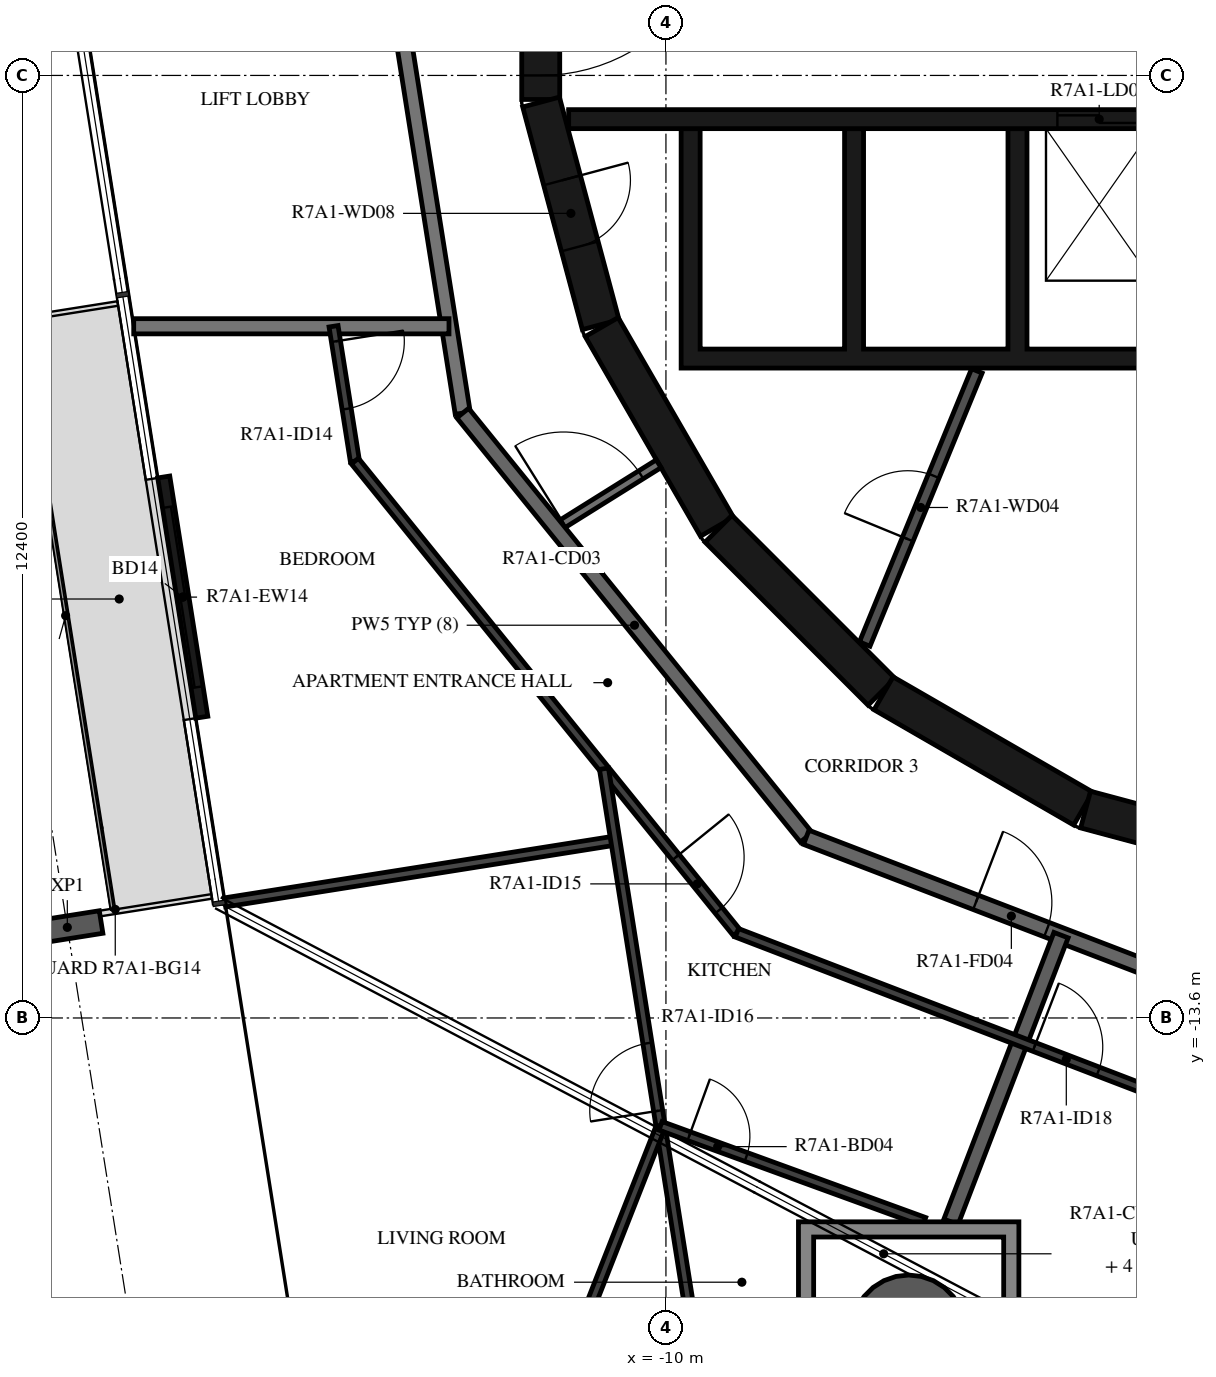
"""IFC4 building model, lengths in metres.
Left out: names, types, materials, properties, quantities, classifications, styles, units other than length and angle.
Written with IfcOpenShell. Run it as: python <this file> out.ifc"""

import sys

from ifc_helpers import new_model, si_unit, direction, frame, frame_2d, origin, origin_2d, place, context, subcontext, project, spatial, polyline, rectangle, hollow_circle, i_section, outline, extrude, element, fill, save


model = new_model("IFC4")
c1 = context("Model", 3, precision=1e-05, world=origin(), true_north=direction((0.0, 1.0)))
c2 = subcontext(c1, "Body", "Model", "MODEL_VIEW")
j1 = project(units=[si_unit("LENGTHUNIT", "METRE"), si_unit("PLANEANGLEUNIT", "RADIAN")], contexts=[c1])
p1 = place(None, origin())
s1 = spatial("IfcSite", under=j1, at=p1, CompositionType="ELEMENT")
p2 = place(p1, origin())
s2 = spatial("IfcBuilding", under=s1, at=p2, CompositionType="ELEMENT")
p3 = place(p2, frame((0.0, 0.0, 266.9)))
s3 = spatial("IfcBuildingStorey", under=s2, at=p3, CompositionType="ELEMENT", Elevation=266.9)
p4 = place(p3, frame((-6.807, -17.732, -0.38), z_axis=(0.0, 0.0, 1.0), x_axis=(1.0, 0.0, 0.0)))
e1 = element("IfcColumn", 1, at=p4, inside=s3, PredefinedType="COLUMN", context=c2, shape_type="SweptSolid", body=[
    extrude(hollow_circle(Radius=0.75, WallThickness=0.035, at=origin_2d()), origin(), (0.0, 0.0, 1.0), 3.5),
])
p5 = place(p3, frame((-17.875, -12.408, -0.38), z_axis=(0.0, 0.0, 1.0), x_axis=(-0.156434064006, 0.987688404113, 0.0)))
e2 = element("IfcColumn", 2, at=p5, inside=s3, PredefinedType="COLUMN", context=c2, shape_type="SweptSolid", body=[
    extrude(i_section(OverallWidth=0.3, OverallDepth=0.9, WebThickness=0.019, FlangeThickness=0.035, FilletRadius=0.03, at=origin_2d()), origin(), (0.0, 0.0, 1.0), 3.5),
])
p6 = place(p3, frame((-16.607, -6.483, 0.0), z_axis=(0.0, 0.0, 1.0), x_axis=(0.156401347891, -0.987693585267, 0.0)))
e3 = element("IfcWall", 3, at=p6, inside=s3, PredefinedType="STANDARD", context=c2, shape_type="SweptSolid", body=[
    extrude(rectangle(XDim=3.2, YDim=0.16, at=frame_2d((1.6, 0.0))), origin(), (0.0, 0.0, 1.0), 3.12),
])
p7 = place(p6, frame((0.4, 0.0, 0.0)))
e4 = element("IfcOpeningElement", 4, at=p7, cuts=e3, PredefinedType="OPENING", context=c2, shape_type="SweptSolid", body=[
    extrude(rectangle(XDim=2.4, YDim=2.4, at=frame_2d((1.2, 1.2))), frame((0.0, 0.09, 0.0), z_axis=(0.0, -1.0, 0.0), x_axis=(1.0, 0.0, 0.0)), (0.0, 0.0, 1.0), 0.18),
])
p8 = place(p3, frame((-11.647, 1.516, 0.0), z_axis=(0.0, 0.0, 1.0), x_axis=(0.0, -1.0, 0.0)))
e5 = element("IfcWall", 5, at=p8, inside=s3, PredefinedType="SHEAR", context=c2, shape_type="SweptSolid", body=[
    extrude(rectangle(XDim=3.033, YDim=0.5, at=frame_2d((1.516, 0.0))), origin(), (0.0, 0.0, 1.0), 3.12),
])
p9 = place(p8, frame((0.316, 0.0, 0.0)))
e6 = element("IfcOpeningElement", 6, at=p9, cuts=e5, PredefinedType="OPENING", context=c2, shape_type="SweptSolid", body=[
    extrude(rectangle(XDim=2.4, YDim=2.1, at=frame_2d((1.2, 1.05))), frame((0.0, 0.26, 0.0), z_axis=(0.0, -1.0, 0.0), x_axis=(1.0, 0.0, 0.0)), (0.0, 0.0, 1.0), 0.52),
])
p10 = place(p3, frame((-11.643, -1.55, 0.0), z_axis=(0.0, 0.0, 1.0), x_axis=(0.258734743916, -0.965948410781, 0.0)))
e7 = element("IfcWall", 7, at=p10, inside=s3, PredefinedType="SHEAR", context=c2, shape_type="SweptSolid", body=[
    extrude(rectangle(XDim=3.033, YDim=0.5, at=frame_2d((1.516, 0.0))), origin(), (0.0, 0.0, 1.0), 3.12),
])
p11 = place(p10, frame((1.066, 0.0, 0.0)))
e8 = element("IfcOpeningElement", 8, at=p11, cuts=e7, PredefinedType="OPENING", context=c2, shape_type="SweptSolid", body=[
    extrude(rectangle(XDim=0.9, YDim=2.1, at=frame_2d((0.45, 1.05))), frame((0.0, 0.26, 0.0), z_axis=(0.0, -1.0, 0.0), x_axis=(1.0, 0.0, 0.0)), (0.0, 0.0, 1.0), 0.52),
])
p12 = place(p3, frame((-10.845, -4.51, 0.0), z_axis=(0.0, 0.0, 1.0), x_axis=(0.500087131594, -0.865975092491, 0.0)))
e9 = element("IfcWall", 9, at=p12, inside=s3, PredefinedType="SHEAR", context=c2, shape_type="SweptSolid", body=[
    extrude(rectangle(XDim=3.033, YDim=0.5, at=frame_2d((1.516, 0.0))), origin(), (0.0, 0.0, 1.0), 3.12),
])
p13 = place(p3, frame((-9.308, -7.164, 0.0), z_axis=(0.0, 0.0, 1.0), x_axis=(0.707106781187, -0.707106781187, 0.0)))
e10 = element("IfcWall", 10, at=p13, inside=s3, PredefinedType="SHEAR", context=c2, shape_type="SweptSolid", body=[
    extrude(rectangle(XDim=3.032, YDim=0.5, at=frame_2d((1.516, 0.0))), origin(), (0.0, 0.0, 1.0), 3.12),
])
for number, where, z_axis, x_axis in (
    (11, (-7.137, -9.329, 0.0), (0.0, 0.0, 1.0), (0.866, -0.5, 0.0)),
    (12, (-4.479, -10.858, 0.0), (0.0, 0.0, 1.0), (0.966, -0.259, 0.0)),
):
    element("IfcWall", number, at=place(p3, frame(where, z_axis=z_axis, x_axis=x_axis)), inside=s3, PredefinedType="SHEAR", context=c2, shape_type="SweptSolid", body=[
        extrude(rectangle(XDim=3.033, YDim=0.5, at=frame_2d((1.516, 0.0))), origin(), (0.0, 0.0, 1.0), 3.12),
    ])
p14 = place(p3, origin())
e13 = element("IfcWall", 13, at=p14, inside=s3, PredefinedType="SHEAR", context=c2, shape_type="SweptSolid", body=[
    extrude(outline(polyline([(9.8, -5.05), (9.8, -4.8), (9.8, -1.9), (9.55, -1.9), (9.55, -4.8), (7.65, -4.8), (7.65, -1.9), (7.4, -1.9), (7.4, -4.8), (5.5, -4.8), (5.5, -1.9), (5.25, -1.9), (5.25, -4.8), (3.35, -4.8), (3.35, -1.9), (3.1, -1.9), (3.1, -4.8), (1.2, -4.8), (1.2, -1.9), (0.95, -1.9), (0.95, -4.8), (-0.95, -4.8), (-0.95, -1.9), (-1.2, -1.9), (-1.2, -4.8), (-3.1, -4.8), (-3.1, -1.9), (-3.35, -1.9), (-3.35, -4.8), (-5.25, -4.8), (-5.25, -1.9), (-5.5, -1.9), (-5.5, -4.8), (-7.4, -4.8), (-7.4, -1.9), (-7.65, -1.9), (-7.65, -4.8), (-9.55, -4.8), (-9.55, -1.9), (-9.8, -1.9), (-9.8, -4.8), (-9.8, -5.05), (9.8, -5.05)])), origin(), (0.0, 0.0, 1.0), 3.12),
])
p15 = place(p3, frame((-11.28, -1.775, 0.0), z_axis=(0.0, 0.0, 1.0), x_axis=(1.0, 0.0, 0.0)))
e14 = element("IfcWall", 14, at=p15, inside=s3, PredefinedType="SHEAR", context=c2, shape_type="SweptSolid", body=[
    extrude(rectangle(XDim=14.38, YDim=0.25, at=frame_2d((7.19, 0.0))), origin(), (0.0, 0.0, 1.0), 3.12),
])
p16 = place(p15, frame((6.43, 0.0, 0.0)))
e15 = element("IfcOpeningElement", 15, at=p16, cuts=e14, PredefinedType="OPENING", context=c2, shape_type="SweptSolid", body=[
    extrude(rectangle(XDim=1.1, YDim=2.1, at=frame_2d((0.55, 1.05))), frame((0.0, 0.135, 0.0), z_axis=(0.0, -1.0, 0.0), x_axis=(1.0, 0.0, 0.0)), (0.0, 0.0, 1.0), 0.27),
])
p17 = place(p15, frame((8.58, 0.0, 0.0)))
e16 = element("IfcOpeningElement", 16, at=p17, cuts=e14, PredefinedType="OPENING", context=c2, shape_type="SweptSolid", body=[
    extrude(rectangle(XDim=1.1, YDim=2.1, at=frame_2d((0.55, 1.05))), frame((0.0, 0.135, 0.0), z_axis=(0.0, -1.0, 0.0), x_axis=(1.0, 0.0, 0.0)), (0.0, 0.0, 1.0), 0.27),
])
p18 = place(p15, frame((10.73, 0.0, 0.0)))
e17 = element("IfcOpeningElement", 17, at=p18, cuts=e14, PredefinedType="OPENING", context=c2, shape_type="SweptSolid", body=[
    extrude(rectangle(XDim=1.1, YDim=2.1, at=frame_2d((0.55, 1.05))), frame((0.0, 0.135, 0.0), z_axis=(0.0, -1.0, 0.0), x_axis=(1.0, 0.0, 0.0)), (0.0, 0.0, 1.0), 0.27),
])
p19 = place(p15, frame((12.98, 0.0, 0.0)))
e18 = element("IfcOpeningElement", 18, at=p19, cuts=e14, PredefinedType="OPENING", context=c2, shape_type="SweptSolid", body=[
    extrude(rectangle(XDim=0.9, YDim=2.1, at=frame_2d((0.45, 1.05))), frame((0.0, 0.135, 0.0), z_axis=(0.0, -1.0, 0.0), x_axis=(1.0, 0.0, 0.0)), (0.0, 0.0, 1.0), 0.27),
])
p20 = place(p3, frame((-7.385, -8.681, 0.0), z_axis=(0.0, 0.0, 1.0), x_axis=(0.379804590409, 0.925066739811, 0.0)))
e19 = element("IfcWall", 19, at=p20, inside=s3, PredefinedType="PARTITIONING", context=c2, shape_type="SweptSolid", body=[
    extrude(rectangle(XDim=3.885, YDim=0.15, at=frame_2d((1.942, 0.0))), origin(), (0.0, 0.0, 1.0), 3.12),
])
p21 = place(p20, frame((1.493, 0.0, 0.0)))
e20 = element("IfcOpeningElement", 20, at=p21, cuts=e19, PredefinedType="OPENING", context=c2, shape_type="SweptSolid", body=[
    extrude(rectangle(XDim=0.9, YDim=2.1, at=frame_2d((0.45, 1.05))), frame((0.0, 0.085, 0.0), z_axis=(0.0, -1.0, 0.0), x_axis=(1.0, 0.0, 0.0)), (0.0, 0.0, 1.0), 0.17),
])
p22 = place(p3, frame((-11.449, -7.154, 0.0), z_axis=(0.0, 0.0, 1.0), x_axis=(0.848067047543, 0.529888934468, 0.0)))
e21 = element("IfcWall", 21, at=p22, inside=s3, PredefinedType="PARTITIONING", context=c2, shape_type="SweptSolid", body=[
    extrude(rectangle(XDim=1.596, YDim=0.12, at=frame_2d((0.798, 0.0))), origin(), (0.0, 0.0, 1.0), 3.12),
])
p23 = place(p22, frame((0.12, 0.0, 0.0)))
e22 = element("IfcOpeningElement", 22, at=p23, cuts=e21, PredefinedType="OPENING", context=c2, shape_type="SweptSolid", body=[
    extrude(rectangle(XDim=1.2, YDim=2.1, at=frame_2d((0.6, 1.05))), frame((0.0, 0.07, 0.0), z_axis=(0.0, -1.0, 0.0), x_axis=(1.0, 0.0, 0.0)), (0.0, 0.0, 1.0), 0.14),
])
p24 = place(p3, frame((-13.797, 1.45, 0.0), z_axis=(0.0, 0.0, 1.0), x_axis=(0.156421704315, -0.987690361611, 0.0)))
e23 = element("IfcWall", 23, at=p24, inside=s3, PredefinedType="STANDARD", context=c2, shape_type="SweptSolid", body=[
    extrude(rectangle(XDim=7.181, YDim=0.2, at=frame_2d((3.591, 0.0))), origin(), (0.0, 0.0, 1.0), 3.12),
])
p25 = place(p3, frame((-12.673, -5.643, 0.0), z_axis=(0.0, 0.0, 1.0), x_axis=(0.629302871585, -0.777160148113, 0.0)))
e24 = element("IfcWall", 24, at=p25, inside=s3, PredefinedType="STANDARD", context=c2, shape_type="SweptSolid", body=[
    extrude(rectangle(XDim=7.181, YDim=0.2, at=frame_2d((3.59, 0.0))), origin(), (0.0, 0.0, 1.0), 3.12),
])
p26 = place(p3, frame((-8.154, -11.223, 0.0), z_axis=(0.0, 0.0, 1.0), x_axis=(0.93359073609, -0.358341090983, 0.0)))
e25 = element("IfcWall", 25, at=p26, inside=s3, PredefinedType="STANDARD", context=c2, shape_type="SweptSolid", body=[
    extrude(rectangle(XDim=7.181, YDim=0.2, at=frame_2d((3.59, 0.0))), origin(), (0.0, 0.0, 1.0), 3.12),
])
p27 = place(p26, frame((2.39, 0.0, 0.0)))
e26 = element("IfcOpeningElement", 26, at=p27, cuts=e25, PredefinedType="OPENING", context=c2, shape_type="SweptSolid", body=[
    extrude(rectangle(XDim=1.0, YDim=2.1, at=frame_2d((0.5, 1.05))), frame((0.0, 0.11, 0.0), z_axis=(0.0, -1.0, 0.0), x_axis=(1.0, 0.0, 0.0)), (0.0, 0.0, 1.0), 0.22),
])
p28 = place(p3, frame((-17.002, -4.5, 0.0), z_axis=(0.0, 0.0, 1.0), x_axis=(1.0, 0.0, 0.0)))
e27 = element("IfcWall", 27, at=p28, inside=s3, PredefinedType="STANDARD", context=c2, shape_type="SweptSolid", body=[
    extrude(rectangle(XDim=4.148, YDim=0.2, at=frame_2d((2.074, 0.0))), origin(), (0.0, 0.0, 1.0), 3.12),
])
p29 = place(p3, frame((-6.25, -16.282, 0.0), z_axis=(0.0, 0.0, 1.0), x_axis=(0.358351333512, 0.933586804625, 0.0)))
e28 = element("IfcWall", 28, at=p29, inside=s3, PredefinedType="STANDARD", context=c2, shape_type="SweptSolid", body=[
    extrude(rectangle(XDim=4.04, YDim=0.2, at=frame_2d((2.02, 0.0))), origin(), (0.0, 0.0, 1.0), 3.12),
])
p30 = place(p3, frame((-14.373, -4.5, 0.0), z_axis=(0.0, 0.0, 1.0), x_axis=(0.156437152886, -0.987687914878, 0.0)))
e29 = element("IfcWall", 29, at=p30, inside=s3, PredefinedType="PARTITIONING", context=c2, shape_type="SweptSolid", body=[
    extrude(rectangle(XDim=1.796, YDim=0.12, at=frame_2d((0.898, 0.0))), origin(), (0.0, 0.0, 1.0), 3.12),
])
p31 = place(p30, frame((0.2, 0.0, 0.0)))
e30 = element("IfcOpeningElement", 30, at=p31, cuts=e29, PredefinedType="OPENING", context=c2, shape_type="SweptSolid", body=[
    extrude(rectangle(XDim=0.9, YDim=2.1, at=frame_2d((0.45, 1.05))), frame((0.0, 0.07, 0.0), z_axis=(0.0, -1.0, 0.0), x_axis=(1.0, 0.0, 0.0)), (0.0, 0.0, 1.0), 0.14),
])
p32 = place(p3, frame((-14.092, -6.274, 0.0), z_axis=(0.0, 0.0, 1.0), x_axis=(0.62933367237, -0.777135206268, 0.0)))
e31 = element("IfcWall", 31, at=p32, inside=s3, PredefinedType="PARTITIONING", context=c2, shape_type="SweptSolid", body=[
    extrude(rectangle(XDim=7.985, YDim=0.12, at=frame_2d((3.992, 0.0))), origin(), (0.0, 0.0, 1.0), 3.12),
])
p33 = place(p32, frame((6.707, 0.0, 0.0)))
e32 = element("IfcOpeningElement", 32, at=p33, cuts=e31, PredefinedType="OPENING", context=c2, shape_type="SweptSolid", body=[
    extrude(rectangle(XDim=0.9, YDim=2.1, at=frame_2d((0.45, 1.05))), frame((0.0, 0.07, 0.0), z_axis=(0.0, -1.0, 0.0), x_axis=(1.0, 0.0, 0.0)), (0.0, 0.0, 1.0), 0.14),
])
p34 = place(p3, frame((-9.067, -12.479, 0.0), z_axis=(0.0, 0.0, 1.0), x_axis=(0.933579449035, -0.358370495911, 0.0)))
e33 = element("IfcWall", 33, at=p34, inside=s3, PredefinedType="PARTITIONING", context=c2, shape_type="SweptSolid", body=[
    extrude(rectangle(XDim=7.985, YDim=0.12, at=frame_2d((3.992, 0.0))), origin(), (0.0, 0.0, 1.0), 3.12),
])
p35 = place(p34, frame((4.192, 0.0, 0.0)))
e34 = element("IfcOpeningElement", 34, at=p35, cuts=e33, PredefinedType="OPENING", context=c2, shape_type="SweptSolid", body=[
    extrude(rectangle(XDim=0.9, YDim=2.1, at=frame_2d((0.45, 1.05))), frame((0.0, 0.07, 0.0), z_axis=(0.0, -1.0, 0.0), x_axis=(1.0, 0.0, 0.0)), (0.0, 0.0, 1.0), 0.14),
])
p36 = place(p3, frame((-15.802, -12.08, 0.0), z_axis=(0.0, 0.0, 1.0), x_axis=(0.987687857978, 0.156437512135, 0.0)))
e35 = element("IfcWall", 35, at=p36, inside=s3, PredefinedType="PARTITIONING", context=c2, shape_type="SweptSolid", body=[
    extrude(rectangle(XDim=5.2, YDim=0.12, at=frame_2d((2.6, 0.0))), origin(), (0.0, 0.0, 1.0), 2.73),
])
p37 = place(p3, frame((-9.619, -17.871, 0.0), z_axis=(0.0, 0.0, 1.0), x_axis=(-0.156433255633, 0.987688532146, 0.0)))
e36 = element("IfcWall", 36, at=p37, inside=s3, PredefinedType="PARTITIONING", context=c2, shape_type="SweptSolid", body=[
    extrude(rectangle(XDim=7.644, YDim=0.12, at=frame_2d((3.822, 0.0))), origin(), (0.0, 0.0, 1.0), 3.12),
])
p38 = place(p37, frame((3.087, 0.0, 0.0)))
e37 = element("IfcOpeningElement", 37, at=p38, cuts=e36, PredefinedType="OPENING", context=c2, shape_type="SweptSolid", body=[
    extrude(rectangle(XDim=0.9, YDim=2.1, at=frame_2d((0.45, 1.05))), frame((0.0, 0.07, 0.0), z_axis=(0.0, -1.0, 0.0), x_axis=(1.0, 0.0, 0.0)), (0.0, 0.0, 1.0), 0.14),
])
p39 = place(p3, frame((-13.067, -22.658, 0.0), z_axis=(0.0, 0.0, 1.0), x_axis=(0.365785999331, 0.930698986082, 0.0)))
e38 = element("IfcWall", 38, at=p39, inside=s3, PredefinedType="PARTITIONING", context=c2, shape_type="SweptSolid", body=[
    extrude(rectangle(XDim=8.196, YDim=0.12, at=frame_2d((4.098, 0.0))), origin(), (0.0, 0.0, 1.0), 3.12),
])
p40 = place(p39, frame((0.5, 0.0, 0.0)))
e39 = element("IfcOpeningElement", 39, at=p40, cuts=e38, PredefinedType="OPENING", context=c2, shape_type="SweptSolid", body=[
    extrude(rectangle(XDim=0.9, YDim=2.1, at=frame_2d((0.45, 1.05))), frame((0.0, 0.07, 0.0), z_axis=(0.0, -1.0, 0.0), x_axis=(1.0, 0.0, 0.0)), (0.0, 0.0, 1.0), 0.14),
])
p41 = place(p3, frame((-10.071, -15.019, 0.0), z_axis=(0.0, 0.0, 1.0), x_axis=(0.939648507355, -0.34214131967, 0.0)))
e40 = element("IfcWall", 40, at=p41, inside=s3, PredefinedType="PARTITIONING", context=c2, shape_type="SweptSolid", body=[
    extrude(rectangle(XDim=3.691, YDim=0.12, at=frame_2d((1.846, 0.0))), origin(), (0.0, 0.0, 1.0), 3.12),
])
p42 = place(p41, frame((0.4, 0.0, 0.0)))
e41 = element("IfcOpeningElement", 41, at=p42, cuts=e40, PredefinedType="OPENING", context=c2, shape_type="SweptSolid", body=[
    extrude(rectangle(XDim=0.8, YDim=2.1, at=frame_2d((0.4, 1.05))), frame((0.0, 0.07, 0.0), z_axis=(0.0, -1.0, 0.0), x_axis=(1.0, 0.0, 0.0)), (0.0, 0.0, 1.0), 0.14),
])
p43 = place(p3, frame((-3.875, -21.019, 0.0), z_axis=(0.0, 0.0, 1.0), x_axis=(0.777149096542, 0.629316519523, 0.0)))
e42 = element("IfcWall", 42, at=p43, inside=s3, PredefinedType="PARTITIONING", context=c2, shape_type="SweptSolid", body=[
    extrude(rectangle(XDim=10.508, YDim=0.12, at=frame_2d((5.254, 0.0))), origin(), (0.0, 0.0, 1.0), 3.12),
])
p44 = place(p43, frame((1.23, 0.0, 0.0)))
e43 = element("IfcOpeningElement", 43, at=p44, cuts=e42, PredefinedType="OPENING", context=c2, shape_type="SweptSolid", body=[
    extrude(rectangle(XDim=0.9, YDim=2.1, at=frame_2d((0.45, 1.05))), frame((0.0, 0.07, 0.0), z_axis=(0.0, -1.0, 0.0), x_axis=(1.0, 0.0, 0.0)), (0.0, 0.0, 1.0), 0.14),
])
p45 = place(p3, origin())
e44 = element("IfcWall", 44, at=p45, inside=s3, PredefinedType="STANDARD", context=c2, shape_type="SweptSolid", body=[
    extrude(outline(polyline([(-5.357, -16.282), (-5.357, -19.182), (-8.257, -19.182), (-8.257, -16.282), (-5.357, -16.282)]), holes=[polyline([(-8.057, -18.982), (-5.557, -18.982), (-5.557, -16.482), (-8.057, -16.482), (-8.057, -18.982)])]), origin(), (0.0, 0.0, 1.0), 3.12),
])
p46 = place(p7, origin())
e45 = element("IfcDoor", 45, at=p46, inside=s3, OperationType="DOUBLE_DOOR_SLIDING", PredefinedType="DOOR", context=c2, shape_type="SweptSolid", body=[
    extrude(rectangle(XDim=2.4, YDim=2.4, at=frame_2d((1.2, 1.2))), frame((0.0, 0.025, 0.0), z_axis=(0.0, -1.0, 0.0), x_axis=(1.0, 0.0, 0.0)), (0.0, 0.0, 1.0), 0.05),
])
fill(e4, e45)
p47 = place(p9, origin())
e46 = element("IfcDoor", 46, at=p47, inside=s3, OperationType="DOUBLE_DOOR_SINGLE_SWING", PredefinedType="DOOR", context=c2, shape_type="SweptSolid", body=[
    extrude(rectangle(XDim=2.4, YDim=2.1, at=frame_2d((1.2, 1.05))), frame((0.0, 0.025, 0.0), z_axis=(0.0, -1.0, 0.0), x_axis=(1.0, 0.0, 0.0)), (0.0, 0.0, 1.0), 0.05),
])
fill(e6, e46)
p48 = place(p16, origin())
e47 = element("IfcDoor", 47, at=p48, inside=s3, OperationType="DOUBLE_DOOR_SLIDING", PredefinedType="DOOR", context=c2, shape_type="SweptSolid", body=[
    extrude(rectangle(XDim=1.1, YDim=2.1, at=frame_2d((0.55, 1.05))), frame((0.0, 0.025, 0.0), z_axis=(0.0, -1.0, 0.0), x_axis=(1.0, 0.0, 0.0)), (0.0, 0.0, 1.0), 0.05),
])
fill(e15, e47)
p49 = place(p21, origin())
e48 = element("IfcDoor", 48, at=p49, inside=s3, OperationType="SINGLE_SWING_RIGHT", PredefinedType="DOOR", context=c2, shape_type="SweptSolid", body=[
    extrude(rectangle(XDim=0.9, YDim=2.1, at=frame_2d((0.45, 1.05))), frame((0.0, 0.025, 0.0), z_axis=(0.0, -1.0, 0.0), x_axis=(1.0, 0.0, 0.0)), (0.0, 0.0, 1.0), 0.05),
])
fill(e20, e48)
p50 = place(p11, origin())
e49 = element("IfcDoor", 49, at=p50, inside=s3, OperationType="SINGLE_SWING_RIGHT", PredefinedType="DOOR", context=c2, shape_type="SweptSolid", body=[
    extrude(rectangle(XDim=0.9, YDim=2.1, at=frame_2d((0.45, 1.05))), frame((0.0, 0.025, 0.0), z_axis=(0.0, -1.0, 0.0), x_axis=(1.0, 0.0, 0.0)), (0.0, 0.0, 1.0), 0.05),
])
fill(e8, e49)
p51 = place(p27, origin())
e50 = element("IfcDoor", 50, at=p51, inside=s3, OperationType="SINGLE_SWING_RIGHT", PredefinedType="DOOR", context=c2, shape_type="SweptSolid", body=[
    extrude(rectangle(XDim=1.0, YDim=2.1, at=frame_2d((0.5, 1.05))), frame((0.0, 0.025, 0.0), z_axis=(0.0, -1.0, 0.0), x_axis=(1.0, 0.0, 0.0)), (0.0, 0.0, 1.0), 0.05),
])
fill(e26, e50)
p52 = place(p31, origin())
e51 = element("IfcDoor", 51, at=p52, inside=s3, OperationType="SINGLE_SWING_RIGHT", PredefinedType="DOOR", context=c2, shape_type="SweptSolid", body=[
    extrude(rectangle(XDim=0.9, YDim=2.1, at=frame_2d((0.45, 1.05))), frame((0.0, 0.025, 0.0), z_axis=(0.0, -1.0, 0.0), x_axis=(1.0, 0.0, 0.0)), (0.0, 0.0, 1.0), 0.05),
])
fill(e30, e51)
p53 = place(p33, origin())
e52 = element("IfcDoor", 52, at=p53, inside=s3, OperationType="SINGLE_SWING_RIGHT", PredefinedType="DOOR", context=c2, shape_type="SweptSolid", body=[
    extrude(rectangle(XDim=0.9, YDim=2.1, at=frame_2d((0.45, 1.05))), frame((0.0, 0.025, 0.0), z_axis=(0.0, -1.0, 0.0), x_axis=(1.0, 0.0, 0.0)), (0.0, 0.0, 1.0), 0.05),
])
fill(e32, e52)
p54 = place(p38, origin())
e53 = element("IfcDoor", 53, at=p54, inside=s3, OperationType="SINGLE_SWING_RIGHT", PredefinedType="DOOR", context=c2, shape_type="SweptSolid", body=[
    extrude(rectangle(XDim=0.9, YDim=2.1, at=frame_2d((0.45, 1.05))), frame((0.0, 0.025, 0.0), z_axis=(0.0, -1.0, 0.0), x_axis=(1.0, 0.0, 0.0)), (0.0, 0.0, 1.0), 0.05),
])
fill(e37, e53)
p55 = place(p42, origin())
e54 = element("IfcDoor", 54, at=p55, inside=s3, OperationType="SINGLE_SWING_RIGHT", PredefinedType="DOOR", context=c2, shape_type="SweptSolid", body=[
    extrude(rectangle(XDim=0.8, YDim=2.1, at=frame_2d((0.4, 1.05))), frame((0.0, 0.025, 0.0), z_axis=(0.0, -1.0, 0.0), x_axis=(1.0, 0.0, 0.0)), (0.0, 0.0, 1.0), 0.05),
])
fill(e41, e54)
p56 = place(p35, origin())
e55 = element("IfcDoor", 55, at=p56, inside=s3, OperationType="SINGLE_SWING_RIGHT", PredefinedType="DOOR", context=c2, shape_type="SweptSolid", body=[
    extrude(rectangle(XDim=0.9, YDim=2.1, at=frame_2d((0.45, 1.05))), frame((0.0, 0.025, 0.0), z_axis=(0.0, -1.0, 0.0), x_axis=(1.0, 0.0, 0.0)), (0.0, 0.0, 1.0), 0.05),
])
fill(e34, e55)
p57 = place(p23, origin())
e56 = element("IfcDoor", 56, at=p57, inside=s3, OperationType="DOUBLE_DOOR_SINGLE_SWING", PredefinedType="DOOR", context=c2, shape_type="SweptSolid", body=[
    extrude(rectangle(XDim=1.2, YDim=2.1, at=frame_2d((0.6, 1.05))), frame((0.0, 0.025, 0.0), z_axis=(0.0, -1.0, 0.0), x_axis=(1.0, 0.0, 0.0)), (0.0, 0.0, 1.0), 0.05),
])
fill(e22, e56)
save(model, sys.argv[1])
